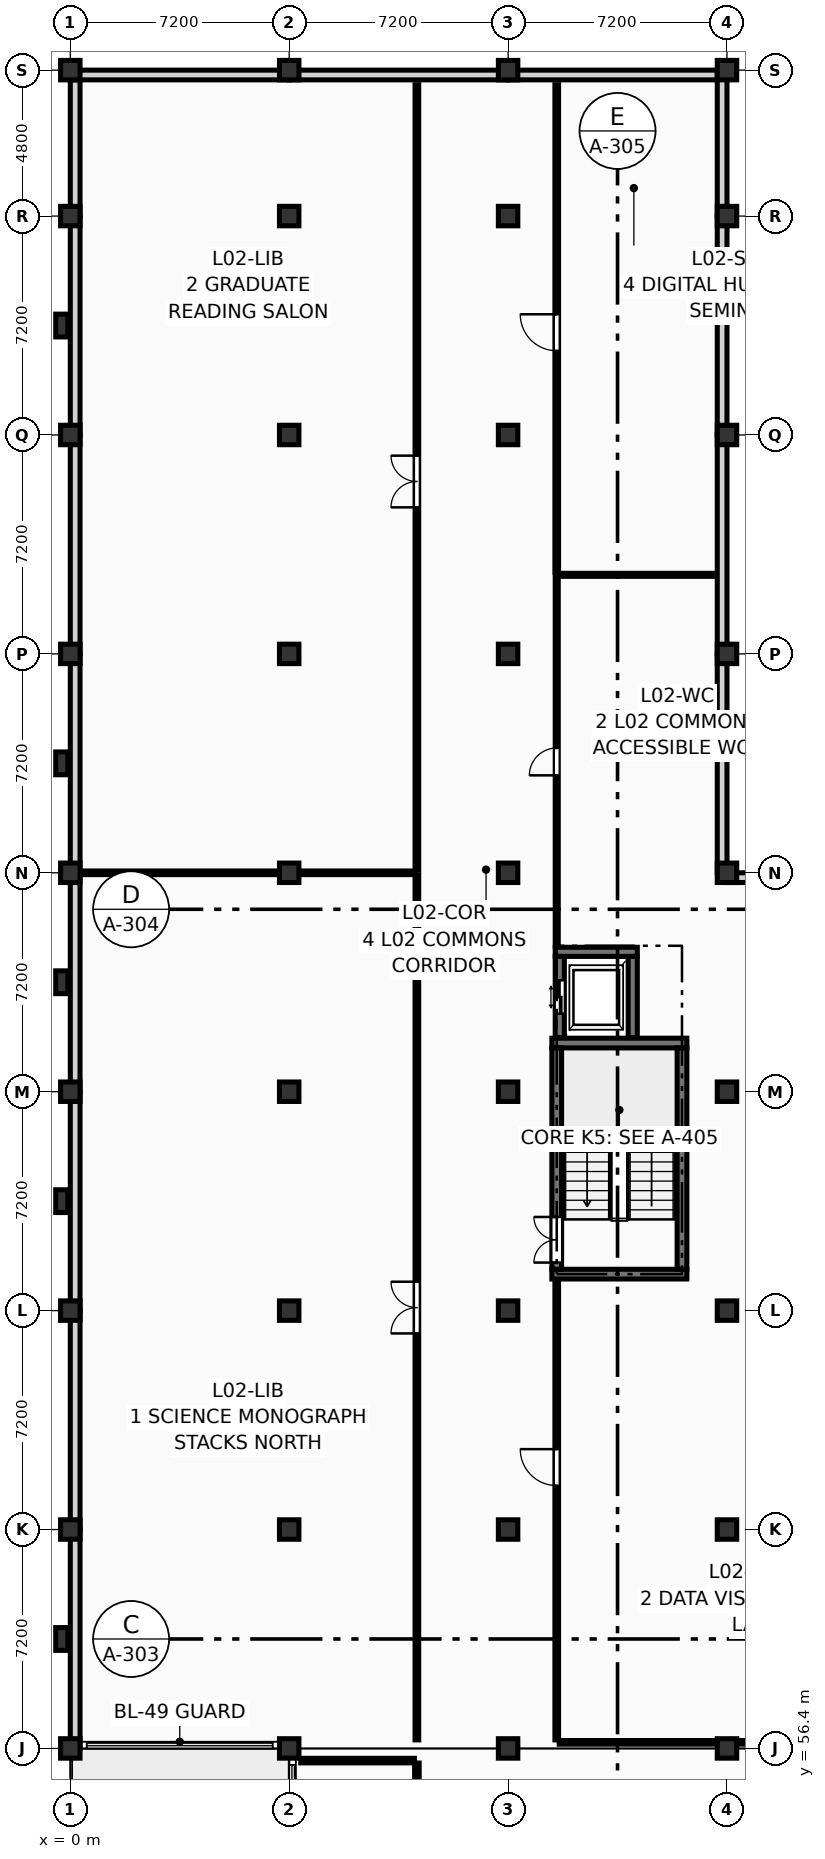
"""IFC4 building model, lengths in metres.
Left out: names, types, materials, properties, quantities, classifications, styles, units other than length and angle.
Written with IfcOpenShell. Run it as: python <this file> out.ifc"""

import sys

from ifc_helpers import new_model, si_unit, direction, frame, frame_2d, origin, origin_2d, place, context, subcontext, project, spatial, rectangle, extrude, element, fill, save


model = new_model("IFC4")
c1 = context("Model", 3, precision=1e-05, world=origin(), true_north=direction((0.0, 1.0)))
c2 = subcontext(c1, "Body", "Model", "MODEL_VIEW")
j1 = project(units=[si_unit("LENGTHUNIT", "METRE"), si_unit("PLANEANGLEUNIT", "RADIAN")], contexts=[c1])
p1 = place(None, origin())
s1 = spatial("IfcSite", under=j1, at=p1, CompositionType="ELEMENT")
p2 = place(p1, origin())
s2 = spatial("IfcBuilding", under=s1, at=p2, CompositionType="ELEMENT")
p3 = place(p2, frame((0.0, 0.0, 8.55)))
s3 = spatial("IfcBuildingStorey", under=s2, at=p3, CompositionType="ELEMENT", Elevation=8.55)
for number, where, z_axis, x_axis in (
    (1, (0.0, 56.4, 0.0), (0.0, 0.0, 1.0), (1.0, 0.0, 0.0)),
    (2, (0.0, 63.6, 0.0), (0.0, 0.0, 1.0), (1.0, 0.0, 0.0)),
    (3, (0.0, 70.8, 0.0), (0.0, 0.0, 1.0), (1.0, 0.0, 0.0)),
    (4, (0.0, 78.0, 0.0), (0.0, 0.0, 1.0), (1.0, 0.0, 0.0)),
    (5, (0.0, 85.2, 0.0), (0.0, 0.0, 1.0), (1.0, 0.0, 0.0)),
    (6, (0.0, 92.4, 0.0), (0.0, 0.0, 1.0), (1.0, 0.0, 0.0)),
    (7, (0.0, 99.6, 0.0), (0.0, 0.0, 1.0), (1.0, 0.0, 0.0)),
    (8, (0.0, 106.8, 0.0), (0.0, 0.0, 1.0), (1.0, 0.0, 0.0)),
    (9, (0.0, 111.6, 0.0), (0.0, 0.0, 1.0), (1.0, 0.0, 0.0)),
    (10, (7.2, 56.4, 0.0), (0.0, 0.0, 1.0), (1.0, 0.0, 0.0)),
    (11, (7.2, 63.6, 0.0), (0.0, 0.0, 1.0), (1.0, 0.0, 0.0)),
    (12, (7.2, 70.8, 0.0), (0.0, 0.0, 1.0), (1.0, 0.0, 0.0)),
    (13, (7.2, 78.0, 0.0), (0.0, 0.0, 1.0), (1.0, 0.0, 0.0)),
    (14, (7.2, 85.2, 0.0), (0.0, 0.0, 1.0), (1.0, 0.0, 0.0)),
    (15, (7.2, 92.4, 0.0), (0.0, 0.0, 1.0), (1.0, 0.0, 0.0)),
    (16, (7.2, 99.6, 0.0), (0.0, 0.0, 1.0), (1.0, 0.0, 0.0)),
    (17, (7.2, 106.8, 0.0), (0.0, 0.0, 1.0), (1.0, 0.0, 0.0)),
    (18, (7.2, 111.6, 0.0), (0.0, 0.0, 1.0), (1.0, 0.0, 0.0)),
    (19, (14.4, 56.4, 0.0), (0.0, 0.0, 1.0), (1.0, 0.0, 0.0)),
    (20, (14.4, 63.6, 0.0), (0.0, 0.0, 1.0), (1.0, 0.0, 0.0)),
    (21, (14.4, 70.8, 0.0), (0.0, 0.0, 1.0), (1.0, 0.0, 0.0)),
    (22, (14.4, 78.0, 0.0), (0.0, 0.0, 1.0), (1.0, 0.0, 0.0)),
    (23, (14.4, 85.2, 0.0), (0.0, 0.0, 1.0), (1.0, 0.0, 0.0)),
    (24, (14.4, 92.4, 0.0), (0.0, 0.0, 1.0), (1.0, 0.0, 0.0)),
    (25, (14.4, 99.6, 0.0), (0.0, 0.0, 1.0), (1.0, 0.0, 0.0)),
    (26, (14.4, 106.8, 0.0), (0.0, 0.0, 1.0), (1.0, 0.0, 0.0)),
    (27, (14.4, 111.6, 0.0), (0.0, 0.0, 1.0), (1.0, 0.0, 0.0)),
    (28, (21.6, 56.4, 0.0), (0.0, 0.0, 1.0), (1.0, 0.0, 0.0)),
    (29, (21.6, 63.6, 0.0), (0.0, 0.0, 1.0), (1.0, 0.0, 0.0)),
    (30, (21.6, 70.8, 0.0), (0.0, 0.0, 1.0), (1.0, 0.0, 0.0)),
    (31, (21.6, 78.0, 0.0), (0.0, 0.0, 1.0), (1.0, 0.0, 0.0)),
    (32, (21.6, 85.2, 0.0), (0.0, 0.0, 1.0), (1.0, 0.0, 0.0)),
    (33, (21.6, 92.4, 0.0), (0.0, 0.0, 1.0), (1.0, 0.0, 0.0)),
    (34, (21.6, 99.6, 0.0), (0.0, 0.0, 1.0), (1.0, 0.0, 0.0)),
    (35, (21.6, 106.8, 0.0), (0.0, 0.0, 1.0), (1.0, 0.0, 0.0)),
    (36, (21.6, 111.6, 0.0), (0.0, 0.0, 1.0), (1.0, 0.0, 0.0)),
):
    element("IfcColumn", number, at=place(p3, frame(where, z_axis=z_axis, x_axis=x_axis)), inside=s3, PredefinedType="COLUMN", context=c2, shape_type="SweptSolid", body=[
        extrude(rectangle(XDim=0.64, YDim=0.64, at=origin_2d()), origin(), (0.0, 0.0, 1.0), 3.6),
    ])
for number, where, z_axis, x_axis in (
    (37, (-0.28, 60.0, 0.0), (0.0, 0.0, 1.0), (1.0, 0.0, 0.0)),
    (38, (-0.28, 74.4, 0.0), (0.0, 0.0, 1.0), (1.0, 0.0, 0.0)),
    (39, (-0.28, 81.6, 0.0), (0.0, 0.0, 1.0), (1.0, 0.0, 0.0)),
    (40, (-0.28, 88.8, 0.0), (0.0, 0.0, 1.0), (1.0, 0.0, 0.0)),
    (41, (-0.28, 103.2, 0.0), (0.0, 0.0, 1.0), (1.0, 0.0, 0.0)),
):
    element("IfcColumn", number, at=place(p3, frame(where, z_axis=z_axis, x_axis=x_axis)), inside=s3, PredefinedType="PILASTER", context=c2, shape_type="SweptSolid", body=[
        extrude(rectangle(XDim=0.4, YDim=0.75, at=origin_2d()), origin(), (0.0, 0.0, 1.0), 3.6),
    ])
p4 = place(p3, frame((0.16, 56.4, 0.0), z_axis=(0.0, 0.0, 1.0), x_axis=(0.0, 1.0, 0.0)))
e42 = element("IfcWall", 42, at=p4, inside=s3, PredefinedType="SOLIDWALL", context=c2, shape_type="SweptSolid", body=[
    extrude(rectangle(XDim=7.2, YDim=0.32, at=frame_2d((3.6, 0.0))), origin(), (0.0, 0.0, 1.0), 2.84),
])
for number, where, z_axis, x_axis in (
    (43, (0.16, 63.6, 0.0), (0.0, 0.0, 1.0), (0.0, 1.0, 0.0)),
    (44, (0.16, 70.8, 0.0), (0.0, 0.0, 1.0), (0.0, 1.0, 0.0)),
    (45, (0.16, 78.0, 0.0), (0.0, 0.0, 1.0), (0.0, 1.0, 0.0)),
    (46, (0.16, 85.2, 0.0), (0.0, 0.0, 1.0), (0.0, 1.0, 0.0)),
):
    element("IfcWall", number, at=place(p3, frame(where, z_axis=z_axis, x_axis=x_axis)), inside=s3, PredefinedType="SOLIDWALL", context=c2, shape_type="SweptSolid", body=[
        extrude(rectangle(XDim=7.2, YDim=0.32, at=frame_2d((3.6, 0.0))), origin(), (0.0, 0.0, 1.0), 2.84),
    ])
p5 = place(p3, frame((0.16, 92.4, 0.0), z_axis=(0.0, 0.0, 1.0), x_axis=(0.0, 1.0, 0.0)))
e47 = element("IfcWall", 47, at=p5, inside=s3, PredefinedType="SOLIDWALL", context=c2, shape_type="SweptSolid", body=[
    extrude(rectangle(XDim=7.2, YDim=0.32, at=frame_2d((3.6, 0.0))), origin(), (0.0, 0.0, 1.0), 2.84),
])
p6 = place(p3, frame((0.16, 99.6, 0.0), z_axis=(0.0, 0.0, 1.0), x_axis=(0.0, 1.0, 0.0)))
e48 = element("IfcWall", 48, at=p6, inside=s3, PredefinedType="SOLIDWALL", context=c2, shape_type="SweptSolid", body=[
    extrude(rectangle(XDim=7.2, YDim=0.32, at=frame_2d((3.6, 0.0))), origin(), (0.0, 0.0, 1.0), 2.84),
])
p7 = place(p3, frame((0.16, 106.8, 0.0), z_axis=(0.0, 0.0, 1.0), x_axis=(0.0, 1.0, 0.0)))
e49 = element("IfcWall", 49, at=p7, inside=s3, PredefinedType="SOLIDWALL", context=c2, shape_type="SweptSolid", body=[
    extrude(rectangle(XDim=4.8, YDim=0.32, at=frame_2d((2.4, 0.0))), origin(), (0.0, 0.0, 1.0), 2.84),
])
for number, where, z_axis, x_axis in (
    (50, (0.0, 111.44, 0.0), (0.0, 0.0, 1.0), (1.0, 0.0, 0.0)),
    (51, (7.2, 111.44, 0.0), (0.0, 0.0, 1.0), (1.0, 0.0, 0.0)),
):
    element("IfcWall", number, at=place(p3, frame(where, z_axis=z_axis, x_axis=x_axis)), inside=s3, PredefinedType="SOLIDWALL", context=c2, shape_type="SweptSolid", body=[
        extrude(rectangle(XDim=7.2, YDim=0.32, at=frame_2d((3.6, 0.0))), origin(), (0.0, 0.0, 1.0), 2.84),
    ])
p8 = place(p3, frame((14.4, 111.44, 0.0), z_axis=(0.0, 0.0, 1.0), x_axis=(1.0, 0.0, 0.0)))
e52 = element("IfcWall", 52, at=p8, inside=s3, PredefinedType="SOLIDWALL", context=c2, shape_type="SweptSolid", body=[
    extrude(rectangle(XDim=7.2, YDim=0.32, at=frame_2d((3.6, 0.0))), origin(), (0.0, 0.0, 1.0), 2.84),
])
p9 = place(p3, frame((21.44, 106.8, 0.0), z_axis=(0.0, 0.0, 1.0), x_axis=(0.0, 1.0, 0.0)))
e53 = element("IfcWall", 53, at=p9, inside=s3, PredefinedType="SOLIDWALL", context=c2, shape_type="SweptSolid", body=[
    extrude(rectangle(XDim=4.8, YDim=0.32, at=frame_2d((2.4, 0.0))), origin(), (0.0, 0.0, 1.0), 2.84),
])
p10 = place(p3, frame((21.44, 99.6, 0.0), z_axis=(0.0, 0.0, 1.0), x_axis=(0.0, 1.0, 0.0)))
e54 = element("IfcWall", 54, at=p10, inside=s3, PredefinedType="SOLIDWALL", context=c2, shape_type="SweptSolid", body=[
    extrude(rectangle(XDim=7.2, YDim=0.32, at=frame_2d((3.6, 0.0))), origin(), (0.0, 0.0, 1.0), 2.84),
])
p11 = place(p3, frame((21.44, 92.4, 0.0), z_axis=(0.0, 0.0, 1.0), x_axis=(0.0, 1.0, 0.0)))
e55 = element("IfcWall", 55, at=p11, inside=s3, PredefinedType="SOLIDWALL", context=c2, shape_type="SweptSolid", body=[
    extrude(rectangle(XDim=7.2, YDim=0.32, at=frame_2d((3.6, 0.0))), origin(), (0.0, 0.0, 1.0), 2.84),
])
for number, where, z_axis, x_axis in (
    (56, (21.44, 85.2, 0.0), (0.0, 0.0, 1.0), (0.0, 1.0, 0.0)),
    (57, (21.6, 85.04, 0.0), (0.0, 0.0, 1.0), (1.0, 0.0, 0.0)),
):
    element("IfcWall", number, at=place(p3, frame(where, z_axis=z_axis, x_axis=x_axis)), inside=s3, PredefinedType="SOLIDWALL", context=c2, shape_type="SweptSolid", body=[
        extrude(rectangle(XDim=7.2, YDim=0.32, at=frame_2d((3.6, 0.0))), origin(), (0.0, 0.0, 1.0), 2.84),
    ])
for number, where, z_axis, x_axis in (
    (58, (15.84, 72.0, 0.0), (0.0, 0.0, 1.0), (1.0, 0.0, 0.0)),
    (59, (15.84, 79.6, 0.0), (0.0, 0.0, 1.0), (1.0, 0.0, 0.0)),
):
    element("IfcWall", number, at=place(p3, frame(where, z_axis=z_axis, x_axis=x_axis)), inside=s3, PredefinedType="SHEAR", context=c2, shape_type="SweptSolid", body=[
        extrude(rectangle(XDim=4.44, YDim=0.32, at=frame_2d((2.22, 0.0))), origin(), (0.0, 0.0, 1.0), 3.39),
    ])
p12 = place(p3, frame((16.0, 72.16, 0.0), z_axis=(0.0, 0.0, 1.0), x_axis=(0.0, 1.0, 0.0)))
e60 = element("IfcWall", 60, at=p12, inside=s3, PredefinedType="SHEAR", context=c2, shape_type="SweptSolid", body=[
    extrude(rectangle(XDim=7.28, YDim=0.32, at=frame_2d((3.64, 0.0))), origin(), (0.0, 0.0, 1.0), 3.39),
])
p13 = place(p12, frame((0.22, 0.0, 0.0)))
e61 = element("IfcOpeningElement", 61, at=p13, cuts=e60, PredefinedType="OPENING", context=c2, shape_type="SweptSolid", body=[
    extrude(rectangle(XDim=1.5, YDim=2.2, at=frame_2d((0.75, 1.1))), frame((0.0, 0.172, 0.0), z_axis=(0.0, -1.0, 0.0), x_axis=(1.0, 0.0, 0.0)), (0.0, 0.0, 1.0), 0.344),
])
p14 = place(p3, frame((20.12, 72.16, 0.0), z_axis=(0.0, 0.0, 1.0), x_axis=(0.0, 1.0, 0.0)))
e62 = element("IfcWall", 62, at=p14, inside=s3, PredefinedType="SHEAR", context=c2, shape_type="SweptSolid", body=[
    extrude(rectangle(XDim=7.28, YDim=0.32, at=frame_2d((3.64, 0.0))), origin(), (0.0, 0.0, 1.0), 3.39),
])
p15 = place(p3, frame((15.95, 82.6, 0.0), z_axis=(0.0, 0.0, 1.0), x_axis=(1.0, 0.0, 0.0)))
e63 = element("IfcWall", 63, at=p15, inside=s3, PredefinedType="SHEAR", context=c2, shape_type="SweptSolid", body=[
    extrude(rectangle(XDim=2.7, YDim=0.3, at=frame_2d((1.35, 0.0))), origin(), (0.0, 0.0, 1.0), 3.39),
])
p16 = place(p3, frame((16.1, 79.78, 0.0), z_axis=(0.0, 0.0, 1.0), x_axis=(0.0, 1.0, 0.0)))
e64 = element("IfcWall", 64, at=p16, inside=s3, PredefinedType="SHEAR", context=c2, shape_type="SweptSolid", body=[
    extrude(rectangle(XDim=2.67, YDim=0.3, at=frame_2d((1.335, 0.0))), origin(), (0.0, 0.0, 1.0), 3.39),
])
p17 = place(p16, frame((0.785, 0.0, 0.0)))
e65 = element("IfcOpeningElement", 65, at=p17, cuts=e64, PredefinedType="OPENING", context=c2, shape_type="SweptSolid", body=[
    extrude(rectangle(XDim=1.1, YDim=2.2, at=frame_2d((0.55, 1.1))), frame((0.0, 0.162, 0.0), z_axis=(0.0, -1.0, 0.0), x_axis=(1.0, 0.0, 0.0)), (0.0, 0.0, 1.0), 0.324),
])
p18 = place(p3, frame((18.5, 79.78, 0.0), z_axis=(0.0, 0.0, 1.0), x_axis=(0.0, 1.0, 0.0)))
e66 = element("IfcWall", 66, at=p18, inside=s3, PredefinedType="SHEAR", context=c2, shape_type="SweptSolid", body=[
    extrude(rectangle(XDim=2.67, YDim=0.3, at=frame_2d((1.335, 0.0))), origin(), (0.0, 0.0, 1.0), 3.39),
])
p19 = place(p3, frame((11.4, 45.28, 0.0), z_axis=(0.0, 0.0, 1.0), x_axis=(0.0, 1.0, 0.0)))
e67 = element("IfcWall", 67, at=p19, inside=s3, PredefinedType="PARTITIONING", context=c2, shape_type="SweptSolid", body=[
    extrude(rectangle(XDim=10.64, YDim=0.15, at=frame_2d((5.32, 0.0))), origin(), (0.0, 0.0, 1.0), 3.375),
])
p20 = place(p19, frame((4.57, 0.0, 0.0)))
e68 = element("IfcOpeningElement", 68, at=p20, cuts=e67, PredefinedType="OPENING", context=c2, shape_type="SweptSolid", body=[
    extrude(rectangle(XDim=1.5, YDim=2.2, at=frame_2d((0.75, 1.1))), frame((0.0, 0.087, 0.0), z_axis=(0.0, -1.0, 0.0), x_axis=(1.0, 0.0, 0.0)), (0.0, 0.0, 1.0), 0.174),
])
p21 = place(p3, frame((7.58, 56.0, 0.0), z_axis=(0.0, 0.0, 1.0), x_axis=(1.0, 0.0, 0.0)))
e69 = element("IfcWall", 69, at=p21, inside=s3, PredefinedType="PARTITIONING", context=c2, shape_type="SweptSolid", body=[
    extrude(rectangle(XDim=3.74, YDim=0.15, at=frame_2d((1.87, 0.0))), origin(), (0.0, 0.0, 1.0), 3.375),
])
p22 = place(p3, frame((11.4, 56.68, 0.0), z_axis=(0.0, 0.0, 1.0), x_axis=(0.0, 1.0, 0.0)))
e70 = element("IfcWall", 70, at=p22, inside=s3, PredefinedType="PARTITIONING", context=c2, shape_type="SweptSolid", body=[
    extrude(rectangle(XDim=28.44, YDim=0.12, at=frame_2d((14.22, 0.0))), origin(), (0.0, 0.0, 1.0), 3.375),
])
p23 = place(p22, frame((13.37, 0.0, 0.0)))
e71 = element("IfcOpeningElement", 71, at=p23, cuts=e70, PredefinedType="OPENING", context=c2, shape_type="SweptSolid", body=[
    extrude(rectangle(XDim=1.7, YDim=2.28, at=frame_2d((0.85, 1.14))), frame((0.0, 0.072, 0.0), z_axis=(0.0, -1.0, 0.0), x_axis=(1.0, 0.0, 0.0)), (0.0, 0.0, 1.0), 0.144),
])
p24 = place(p3, frame((0.48, 85.2, 0.0), z_axis=(0.0, 0.0, 1.0), x_axis=(1.0, 0.0, 0.0)))
e72 = element("IfcWall", 72, at=p24, inside=s3, PredefinedType="PARTITIONING", context=c2, shape_type="SweptSolid", body=[
    extrude(rectangle(XDim=10.84, YDim=0.12, at=frame_2d((5.42, 0.0))), origin(), (0.0, 0.0, 1.0), 2.595),
])
p25 = place(p3, frame((11.4, 85.28, 0.0), z_axis=(0.0, 0.0, 1.0), x_axis=(0.0, 1.0, 0.0)))
e73 = element("IfcWall", 73, at=p25, inside=s3, PredefinedType="PARTITIONING", context=c2, shape_type="SweptSolid", body=[
    extrude(rectangle(XDim=25.84, YDim=0.12, at=frame_2d((12.92, 0.0))), origin(), (0.0, 0.0, 1.0), 3.375),
])
p26 = place(p25, frame((11.94, 0.0, 0.0)))
e74 = element("IfcOpeningElement", 74, at=p26, cuts=e73, PredefinedType="OPENING", context=c2, shape_type="SweptSolid", body=[
    extrude(rectangle(XDim=1.7, YDim=2.28, at=frame_2d((0.85, 1.14))), frame((0.0, 0.072, 0.0), z_axis=(0.0, -1.0, 0.0), x_axis=(1.0, 0.0, 0.0)), (0.0, 0.0, 1.0), 0.144),
])
p27 = place(p3, frame((16.0, 56.68, 0.0), z_axis=(0.0, 0.0, 1.0), x_axis=(0.0, 1.0, 0.0)))
e75 = element("IfcWall", 75, at=p27, inside=s3, PredefinedType="PARTITIONING", context=c2, shape_type="SweptSolid", body=[
    extrude(rectangle(XDim=15.12, YDim=0.12, at=frame_2d((7.56, 0.0))), origin(), (0.0, 0.0, 1.0), 3.375),
])
p28 = place(p27, frame((8.364, 0.0, 0.0)))
e76 = element("IfcOpeningElement", 76, at=p28, cuts=e75, PredefinedType="OPENING", context=c2, shape_type="SweptSolid", body=[
    extrude(rectangle(XDim=1.2, YDim=2.15, at=frame_2d((0.6, 1.075))), frame((0.0, 0.072, 0.0), z_axis=(0.0, -1.0, 0.0), x_axis=(1.0, 0.0, 0.0)), (0.0, 0.0, 1.0), 0.144),
])
p29 = place(p3, frame((16.08, 56.6, 0.0), z_axis=(0.0, 0.0, 1.0), x_axis=(1.0, 0.0, 0.0)))
e77 = element("IfcWall", 77, at=p29, inside=s3, PredefinedType="PARTITIONING", context=c2, shape_type="SweptSolid", body=[
    extrude(rectangle(XDim=12.24, YDim=0.12, at=frame_2d((6.12, 0.0))), origin(), (0.0, 0.0, 1.0), 2.595),
])
p30 = place(p3, frame((16.0, 82.79, 0.0), z_axis=(0.0, 0.0, 1.0), x_axis=(0.0, 1.0, 0.0)))
e78 = element("IfcWall", 78, at=p30, inside=s3, PredefinedType="PARTITIONING", context=c2, shape_type="SweptSolid", body=[
    extrude(rectangle(XDim=12.13, YDim=0.1, at=frame_2d((6.065, 0.0))), origin(), (0.0, 0.0, 1.0), 3.375),
])
p31 = place(p30, frame((5.615, 0.0, 0.0)))
e79 = element("IfcOpeningElement", 79, at=p31, cuts=e78, PredefinedType="OPENING", context=c2, shape_type="SweptSolid", body=[
    extrude(rectangle(XDim=0.9, YDim=2.1, at=frame_2d((0.45, 1.05))), frame((0.0, 0.062, 0.0), z_axis=(0.0, -1.0, 0.0), x_axis=(1.0, 0.0, 0.0)), (0.0, 0.0, 1.0), 0.124),
])
p32 = place(p3, frame((16.08, 95.0, 0.0), z_axis=(0.0, 0.0, 1.0), x_axis=(1.0, 0.0, 0.0)))
e80 = element("IfcWall", 80, at=p32, inside=s3, PredefinedType="PARTITIONING", context=c2, shape_type="SweptSolid", body=[
    extrude(rectangle(XDim=5.04, YDim=0.1, at=frame_2d((2.52, 0.0))), origin(), (0.0, 0.0, 1.0), 3.375),
])
p33 = place(p3, frame((16.0, 95.08, 0.0), z_axis=(0.0, 0.0, 1.0), x_axis=(0.0, 1.0, 0.0)))
e81 = element("IfcWall", 81, at=p33, inside=s3, PredefinedType="PARTITIONING", context=c2, shape_type="SweptSolid", body=[
    extrude(rectangle(XDim=16.04, YDim=0.12, at=frame_2d((8.02, 0.0))), origin(), (0.0, 0.0, 1.0), 3.375),
])
p34 = place(p33, frame((7.29, 0.0, 0.0)))
e82 = element("IfcOpeningElement", 82, at=p34, cuts=e81, PredefinedType="OPENING", context=c2, shape_type="SweptSolid", body=[
    extrude(rectangle(XDim=1.2, YDim=2.15, at=frame_2d((0.6, 1.075))), frame((0.0, 0.072, 0.0), z_axis=(0.0, -1.0, 0.0), x_axis=(1.0, 0.0, 0.0)), (0.0, 0.0, 1.0), 0.144),
])
p35 = place(p13, origin())
e83 = element("IfcDoor", 83, at=p35, inside=s3, OperationType="DOUBLE_DOOR_SINGLE_SWING", PredefinedType="DOOR", context=c2, shape_type="SweptSolid", body=[
    extrude(rectangle(XDim=1.5, YDim=2.2, at=frame_2d((0.75, 1.1))), frame((0.0, 0.025, 0.0), z_axis=(0.0, -1.0, 0.0), x_axis=(1.0, 0.0, 0.0)), (0.0, 0.0, 1.0), 0.05),
])
fill(e61, e83)
p36 = place(p17, origin())
e84 = element("IfcDoor", 84, at=p36, inside=s3, OperationType="DOUBLE_DOOR_SLIDING", PredefinedType="DOOR", context=c2, shape_type="SweptSolid", body=[
    extrude(rectangle(XDim=1.1, YDim=2.2, at=frame_2d((0.55, 1.1))), frame((0.0, 0.025, 0.0), z_axis=(0.0, -1.0, 0.0), x_axis=(1.0, 0.0, 0.0)), (0.0, 0.0, 1.0), 0.05),
])
fill(e65, e84)
p37 = place(p23, origin())
e85 = element("IfcDoor", 85, at=p37, inside=s3, OperationType="DOUBLE_DOOR_SINGLE_SWING", PredefinedType="DOOR", context=c2, shape_type="SweptSolid", body=[
    extrude(rectangle(XDim=1.7, YDim=2.28, at=frame_2d((0.85, 1.14))), frame((0.0, 0.025, 0.0), z_axis=(0.0, -1.0, 0.0), x_axis=(1.0, 0.0, 0.0)), (0.0, 0.0, 1.0), 0.05),
])
fill(e71, e85)
p38 = place(p26, origin())
e86 = element("IfcDoor", 86, at=p38, inside=s3, OperationType="DOUBLE_DOOR_SINGLE_SWING", PredefinedType="DOOR", context=c2, shape_type="SweptSolid", body=[
    extrude(rectangle(XDim=1.7, YDim=2.28, at=frame_2d((0.85, 1.14))), frame((0.0, 0.025, 0.0), z_axis=(0.0, -1.0, 0.0), x_axis=(1.0, 0.0, 0.0)), (0.0, 0.0, 1.0), 0.05),
])
fill(e74, e86)
p39 = place(p28, origin())
e87 = element("IfcDoor", 87, at=p39, inside=s3, OperationType="SINGLE_SWING_RIGHT", PredefinedType="DOOR", context=c2, shape_type="SweptSolid", body=[
    extrude(rectangle(XDim=1.2, YDim=2.15, at=frame_2d((0.6, 1.075))), frame((0.0, 0.025, 0.0), z_axis=(0.0, -1.0, 0.0), x_axis=(1.0, 0.0, 0.0)), (0.0, 0.0, 1.0), 0.05),
])
fill(e76, e87)
p40 = place(p31, origin())
e88 = element("IfcDoor", 88, at=p40, inside=s3, OperationType="SINGLE_SWING_LEFT", PredefinedType="DOOR", context=c2, shape_type="SweptSolid", body=[
    extrude(rectangle(XDim=0.9, YDim=2.1, at=frame_2d((0.45, 1.05))), frame((0.0, 0.025, 0.0), z_axis=(0.0, -1.0, 0.0), x_axis=(1.0, 0.0, 0.0)), (0.0, 0.0, 1.0), 0.05),
])
fill(e79, e88)
p41 = place(p34, origin())
e89 = element("IfcDoor", 89, at=p41, inside=s3, OperationType="SINGLE_SWING_RIGHT", PredefinedType="DOOR", context=c2, shape_type="SweptSolid", body=[
    extrude(rectangle(XDim=1.2, YDim=2.15, at=frame_2d((0.6, 1.075))), frame((0.0, 0.025, 0.0), z_axis=(0.0, -1.0, 0.0), x_axis=(1.0, 0.0, 0.0)), (0.0, 0.0, 1.0), 0.05),
])
fill(e82, e89)
save(model, sys.argv[1])
